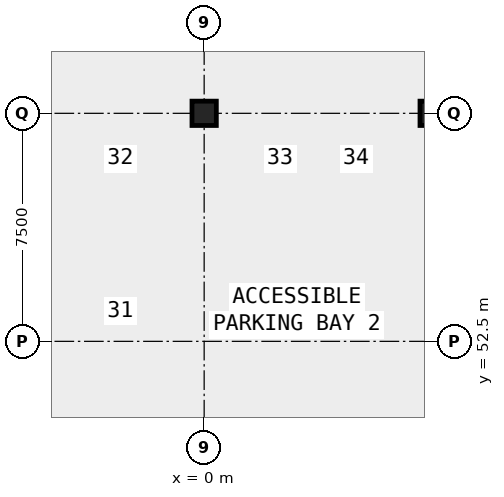
"""IFC4 building model, lengths in metres.
Left out: names, types, materials, properties, quantities, classifications, styles, units other than length and angle.
Written with IfcOpenShell. Run it as: python <this file> out.ifc"""

import sys

from ifc_helpers import new_model, si_unit, direction, frame, origin, origin_2d, place, context, subcontext, project, spatial, rectangle, extrude, element, save


model = new_model("IFC4")
c1 = context("Model", 3, precision=1e-05, world=origin(), true_north=direction((0.0, 1.0)))
c2 = subcontext(c1, "Body", "Model", "MODEL_VIEW")
j1 = project(units=[si_unit("LENGTHUNIT", "METRE"), si_unit("PLANEANGLEUNIT", "RADIAN")], contexts=[c1])
p1 = place(None, origin())
s1 = spatial("IfcSite", under=j1, at=p1, CompositionType="ELEMENT")
p2 = place(p1, origin())
s2 = spatial("IfcBuilding", under=s1, at=p2, CompositionType="ELEMENT")
p3 = place(p2, frame((0.0, 0.0, -5.5)))
s3 = spatial("IfcBuildingStorey", under=s2, at=p3, CompositionType="ELEMENT", Elevation=-5.5)
for number, where, z_axis, x_axis in (
    (1, (0.0, 60.0, -0.42), (0.0, 0.0, 1.0), (1.0, 0.0, 0.0)),
    (2, (7.5, 60.0, -0.42), (0.0, 0.0, 1.0), (1.0, 0.0, 0.0)),
):
    element("IfcColumn", number, at=place(p3, frame(where, z_axis=z_axis, x_axis=x_axis)), inside=s3, PredefinedType="COLUMN", context=c2, shape_type="SweptSolid", body=[
        extrude(rectangle(XDim=0.8, YDim=0.8, at=origin_2d()), origin(), (0.0, 0.0, 1.0), 5.72),
    ])
save(model, sys.argv[1])
